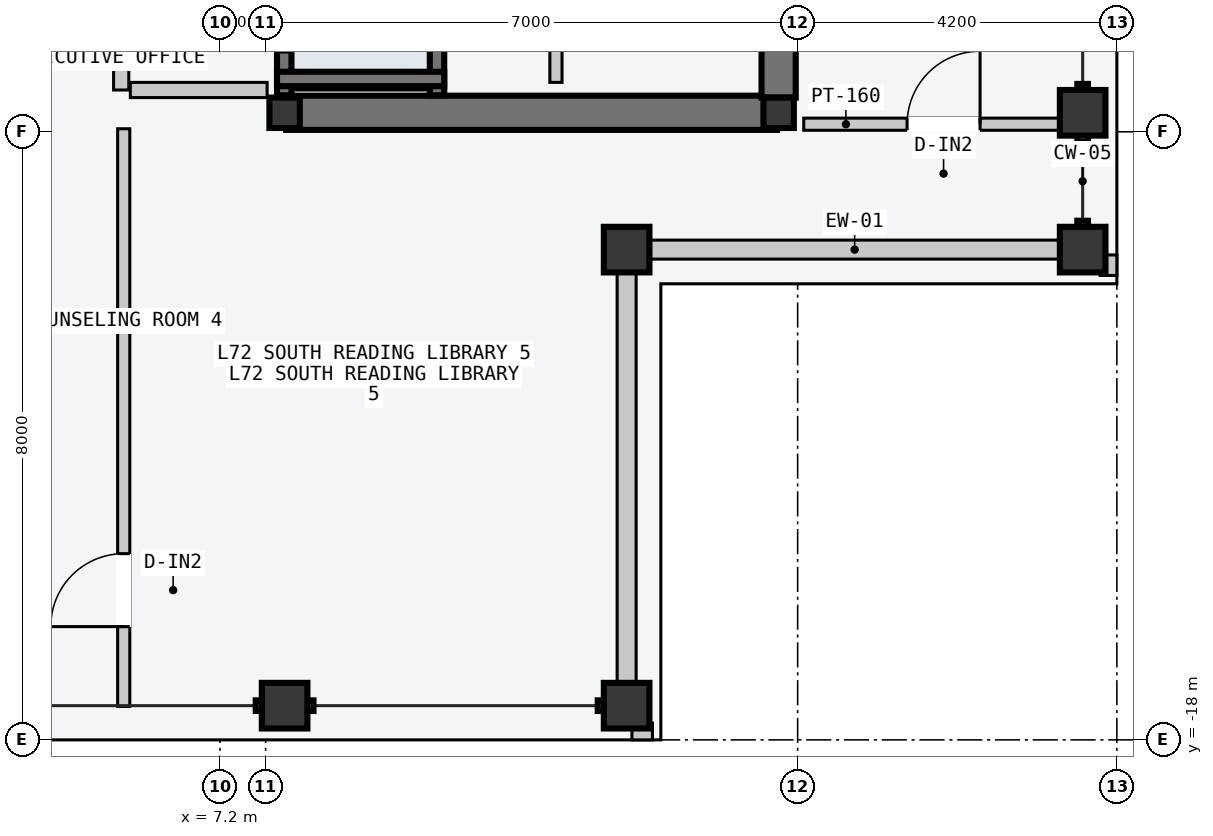
"""IFC4 building model, lengths in metres.
Left out: names, types, materials, properties, quantities, classifications, styles, units other than length and angle.
Written with IfcOpenShell. Run it as: python <this file> out.ifc"""

import sys

from ifc_helpers import new_model, si_unit, direction, frame, frame_2d, origin, origin_2d, place, context, subcontext, project, spatial, rectangle, hollow_rectangle, i_section, extrude, element, fill, save


model = new_model("IFC4")
c1 = context("Model", 3, precision=1e-05, world=origin(), true_north=direction((0.0, 1.0)))
c2 = subcontext(c1, "Body", "Model", "MODEL_VIEW")
j1 = project(units=[si_unit("LENGTHUNIT", "METRE"), si_unit("PLANEANGLEUNIT", "RADIAN")], contexts=[c1])
p1 = place(None, origin())
s1 = spatial("IfcSite", under=j1, at=p1, CompositionType="ELEMENT")
p2 = place(p1, origin())
s2 = spatial("IfcBuilding", under=s1, at=p2, CompositionType="ELEMENT")
p3 = place(p2, frame((0.0, 0.0, 272.4)))
s3 = spatial("IfcBuildingStorey", under=s2, at=p3, CompositionType="ELEMENT", Elevation=272.4)
p4 = place(p3, frame((8.07, -9.75, -0.2), z_axis=(0.0, 0.0, 1.0), x_axis=(1.0, 0.0, 0.0)))
e1 = element("IfcWall", 1, at=p4, inside=s3, PredefinedType="SHEAR", context=c2, shape_type="SweptSolid", body=[
    extrude(rectangle(XDim=6.46, YDim=0.45, at=frame_2d((3.23, 0.0))), origin(), (0.0, 0.0, 1.0), 3.6),
])
p5 = place(p3, frame((14.55, -9.55, -0.2), z_axis=(0.0, 0.0, 1.0), x_axis=(0.0, 1.0, 0.0)))
e2 = element("IfcWall", 2, at=p5, inside=s3, PredefinedType="SHEAR", context=c2, shape_type="SweptSolid", body=[
    extrude(rectangle(XDim=9.35, YDim=0.45, at=frame_2d((4.675, 0.0))), origin(), (0.0, 0.0, 1.0), 3.6),
])
for number, where, z_axis, x_axis in (
    (3, (8.05, -9.75, 0.0), (0.0, 0.0, 1.0), (1.0, 0.0, 0.0)),
    (4, (14.55, -9.75, 0.0), (0.0, 0.0, 1.0), (1.0, 0.0, 0.0)),
):
    element("IfcColumn", number, at=place(p3, frame(where, z_axis=z_axis, x_axis=x_axis)), inside=s3, PredefinedType="COLUMN", context=c2, shape_type="SweptSolid", body=[
        extrude(i_section(OverallWidth=0.4, OverallDepth=0.4, WebThickness=0.013, FlangeThickness=0.021, at=origin_2d()), origin(), (0.0, 0.0, 1.0), 3.6),
    ])
for number, where, z_axis, x_axis in (
    (5, (8.05, -17.55, 0.0), (0.0, 0.0, 1.0), (1.0, 0.0, 0.0)),
    (6, (12.55, -17.55, 0.0), (0.0, 0.0, 1.0), (1.0, 0.0, 0.0)),
    (7, (18.55, -11.55, 0.0), (0.0, 0.0, 1.0), (0.0, 1.0, 0.0)),
    (8, (18.55, -9.75, 0.0), (0.0, 0.0, 1.0), (0.0, 1.0, 0.0)),
    (9, (12.55, -11.55, 0.0), (0.0, 0.0, 1.0), (1.0, 0.0, 0.0)),
):
    element("IfcColumn", number, at=place(p3, frame(where, z_axis=z_axis, x_axis=x_axis)), inside=s3, PredefinedType="COLUMN", context=c2, shape_type="SweptSolid", body=[
        extrude(hollow_rectangle(XDim=0.6, YDim=0.6, WallThickness=0.025, at=origin_2d()), origin(), (0.0, 0.0, 1.0), 3.6),
    ])
for number, where, z_axis, x_axis in (
    (10, (12.86, -11.55, 0.0), (0.0, 0.0, 1.0), (1.0, 0.0, 0.0)),
    (11, (12.55, -17.24, 0.0), (0.0, 0.0, 1.0), (0.0, 1.0, 0.0)),
):
    element("IfcWall", number, at=place(p3, frame(where, z_axis=z_axis, x_axis=x_axis)), inside=s3, PredefinedType="STANDARD", context=c2, shape_type="SweptSolid", body=[
        extrude(rectangle(XDim=5.38, YDim=0.25, at=frame_2d((2.69, 0.0))), origin(), (0.0, 0.0, 1.0), 2.85),
    ])
for number, where, z_axis, x_axis in (
    (12, (12.62, -17.89, 0.0), (0.0, 0.0, 1.0), (1.0, 0.0, 0.0)),
    (13, (18.89, -11.89, 0.0), (0.0, 0.0, 1.0), (0.0, 1.0, 0.0)),
):
    element("IfcWall", number, at=place(p3, frame(where, z_axis=z_axis, x_axis=x_axis)), inside=s3, PredefinedType="PARAPET", context=c2, shape_type="SweptSolid", body=[
        extrude(rectangle(XDim=0.27, YDim=0.22, at=frame_2d((0.135, 0.0))), origin(), (0.0, 0.0, 1.0), 1.2),
    ])
p6 = place(p3, frame((8.045, -9.52, -0.2), z_axis=(0.0, 0.0, 1.0), x_axis=(0.0, 1.0, 0.0)))
e14 = element("IfcWall", 14, at=p6, inside=s3, PredefinedType="SOLIDWALL", context=c2, shape_type="SweptSolid", body=[
    extrude(rectangle(XDim=2.12, YDim=0.19, at=frame_2d((1.06, 0.0))), origin(), (0.0, 0.0, 1.0), 3.6),
])
p7 = place(p6, frame((0.57, 0.0, 0.2)))
e15 = element("IfcOpeningElement", 15, at=p7, cuts=e14, PredefinedType="OPENING", context=c2, shape_type="SweptSolid", body=[
    extrude(rectangle(XDim=1.1, YDim=2.2, at=frame_2d((0.55, 1.1))), frame((0.0, 0.105, 0.0), z_axis=(0.0, -1.0, 0.0), x_axis=(1.0, 0.0, 0.0)), (0.0, 0.0, 1.0), 0.21),
])
p8 = place(p3, frame((10.055, -9.52, -0.2), z_axis=(0.0, 0.0, 1.0), x_axis=(0.0, 1.0, 0.0)))
e16 = element("IfcWall", 16, at=p8, inside=s3, PredefinedType="SOLIDWALL", context=c2, shape_type="SweptSolid", body=[
    extrude(rectangle(XDim=2.12, YDim=0.19, at=frame_2d((1.06, 0.0))), origin(), (0.0, 0.0, 1.0), 3.6),
])
p9 = place(p3, frame((7.95, -9.305, -0.2), z_axis=(0.0, 0.0, 1.0), x_axis=(1.0, 0.0, 0.0)))
e17 = element("IfcWall", 17, at=p9, inside=s3, PredefinedType="SOLIDWALL", context=c2, shape_type="SweptSolid", body=[
    extrude(rectangle(XDim=2.2, YDim=0.19, at=frame_2d((1.1, 0.0))), origin(), (0.0, 0.0, 1.0), 3.6),
])
p10 = place(p3, frame((5.9, -9.45, 0.0), z_axis=(0.0, 0.0, 1.0), x_axis=(0.0, 1.0, 0.0)))
e18 = element("IfcWall", 18, at=p10, inside=s3, PredefinedType="PARTITIONING", context=c2, shape_type="SweptSolid", body=[
    extrude(rectangle(XDim=10.5, YDim=0.2, at=frame_2d((5.25, 0.0))), origin(), (0.0, 0.0, 1.0), 3.4),
])
p11 = place(p10, frame((3.9, 0.0, 0.0)))
e19 = element("IfcOpeningElement", 19, at=p11, cuts=e18, PredefinedType="OPENING", context=c2, shape_type="SweptSolid", body=[
    extrude(rectangle(XDim=1.5, YDim=2.2, at=frame_2d((0.75, 1.1))), frame((0.0, 0.11, 0.0), z_axis=(0.0, -1.0, 0.0), x_axis=(1.0, 0.0, 0.0)), (0.0, 0.0, 1.0), 0.22),
])
p12 = place(p3, frame((6.02, -9.45, 0.0), z_axis=(0.0, 0.0, 1.0), x_axis=(1.0, 0.0, 0.0)))
e20 = element("IfcWall", 20, at=p12, inside=s3, PredefinedType="PARTITIONING", context=c2, shape_type="SweptSolid", body=[
    extrude(rectangle(XDim=1.8, YDim=0.2, at=frame_2d((0.9, 0.0))), origin(), (0.0, 0.0, 1.0), 3.4),
])
p13 = place(p3, frame((11.62, -9.35, 0.0), z_axis=(0.0, 0.0, 1.0), x_axis=(0.0, 1.0, 0.0)))
e21 = element("IfcWall", 21, at=p13, inside=s3, PredefinedType="PARTITIONING", context=c2, shape_type="SweptSolid", body=[
    extrude(rectangle(XDim=3.85, YDim=0.16, at=frame_2d((1.925, 0.0))), origin(), (0.0, 0.0, 1.0), 3.4),
])
p14 = place(p13, frame((0.512, 0.0, 0.0)))
e22 = element("IfcOpeningElement", 22, at=p14, cuts=e21, PredefinedType="OPENING", context=c2, shape_type="SweptSolid", body=[
    extrude(rectangle(XDim=0.9, YDim=2.15, at=frame_2d((0.45, 1.075))), frame((0.0, 0.09, 0.0), z_axis=(0.0, -1.0, 0.0), x_axis=(1.0, 0.0, 0.0)), (0.0, 0.0, 1.0), 0.18),
])
p15 = place(p13, frame((2.438, 0.0, 0.0)))
e23 = element("IfcOpeningElement", 23, at=p15, cuts=e21, PredefinedType="OPENING", context=c2, shape_type="SweptSolid", body=[
    extrude(rectangle(XDim=0.9, YDim=2.15, at=frame_2d((0.45, 1.075))), frame((0.0, 0.09, 0.0), z_axis=(0.0, -1.0, 0.0), x_axis=(1.0, 0.0, 0.0)), (0.0, 0.0, 1.0), 0.18),
])
p16 = place(p3, frame((5.933, -17.56, 0.0), z_axis=(0.0, 0.0, 1.0), x_axis=(0.0, 1.0, 0.0)))
e24 = element("IfcWall", 24, at=p16, inside=s3, PredefinedType="PARTITIONING", context=c2, shape_type="SweptSolid", body=[
    extrude(rectangle(XDim=7.6, YDim=0.16, at=frame_2d((3.8, 0.0))), origin(), (0.0, 0.0, 1.0), 3.4),
])
p17 = place(p16, frame((1.05, 0.0, 0.0)))
e25 = element("IfcOpeningElement", 25, at=p17, cuts=e24, PredefinedType="OPENING", context=c2, shape_type="SweptSolid", body=[
    extrude(rectangle(XDim=0.96, YDim=2.18, at=frame_2d((0.48, 1.09))), frame((0.0, 0.09, 0.0), z_axis=(0.0, -1.0, 0.0), x_axis=(1.0, 0.0, 0.0)), (0.0, 0.0, 1.0), 0.18),
])
p18 = place(p3, frame((14.88, -9.9, 0.0), z_axis=(0.0, 0.0, 1.0), x_axis=(1.0, 0.0, 0.0)))
e26 = element("IfcWall", 26, at=p18, inside=s3, PredefinedType="PARTITIONING", context=c2, shape_type="SweptSolid", body=[
    extrude(rectangle(XDim=3.68, YDim=0.16, at=frame_2d((1.84, 0.0))), origin(), (0.0, 0.0, 1.0), 3.4),
])
p19 = place(p18, frame((1.36, 0.0, 0.0)))
e27 = element("IfcOpeningElement", 27, at=p19, cuts=e26, PredefinedType="OPENING", context=c2, shape_type="SweptSolid", body=[
    extrude(rectangle(XDim=0.96, YDim=2.18, at=frame_2d((0.48, 1.09))), frame((0.0, 0.09, 0.0), z_axis=(0.0, -1.0, 0.0), x_axis=(1.0, 0.0, 0.0)), (0.0, 0.0, 1.0), 0.18),
])
p20 = place(p17, origin())
e28 = element("IfcDoor", 28, at=p20, inside=s3, OperationType="SINGLE_SWING_LEFT", PredefinedType="DOOR", context=c2, shape_type="SweptSolid", body=[
    extrude(rectangle(XDim=0.96, YDim=2.18, at=frame_2d((0.48, 1.09))), frame((0.0, 0.025, 0.0), z_axis=(0.0, -1.0, 0.0), x_axis=(1.0, 0.0, 0.0)), (0.0, 0.0, 1.0), 0.05),
])
fill(e25, e28)
p21 = place(p19, origin())
e29 = element("IfcDoor", 29, at=p21, inside=s3, OperationType="SINGLE_SWING_RIGHT", PredefinedType="DOOR", context=c2, shape_type="SweptSolid", body=[
    extrude(rectangle(XDim=0.96, YDim=2.18, at=frame_2d((0.48, 1.09))), frame((0.0, 0.025, 0.0), z_axis=(0.0, -1.0, 0.0), x_axis=(1.0, 0.0, 0.0)), (0.0, 0.0, 1.0), 0.05),
])
fill(e27, e29)
save(model, sys.argv[1])
